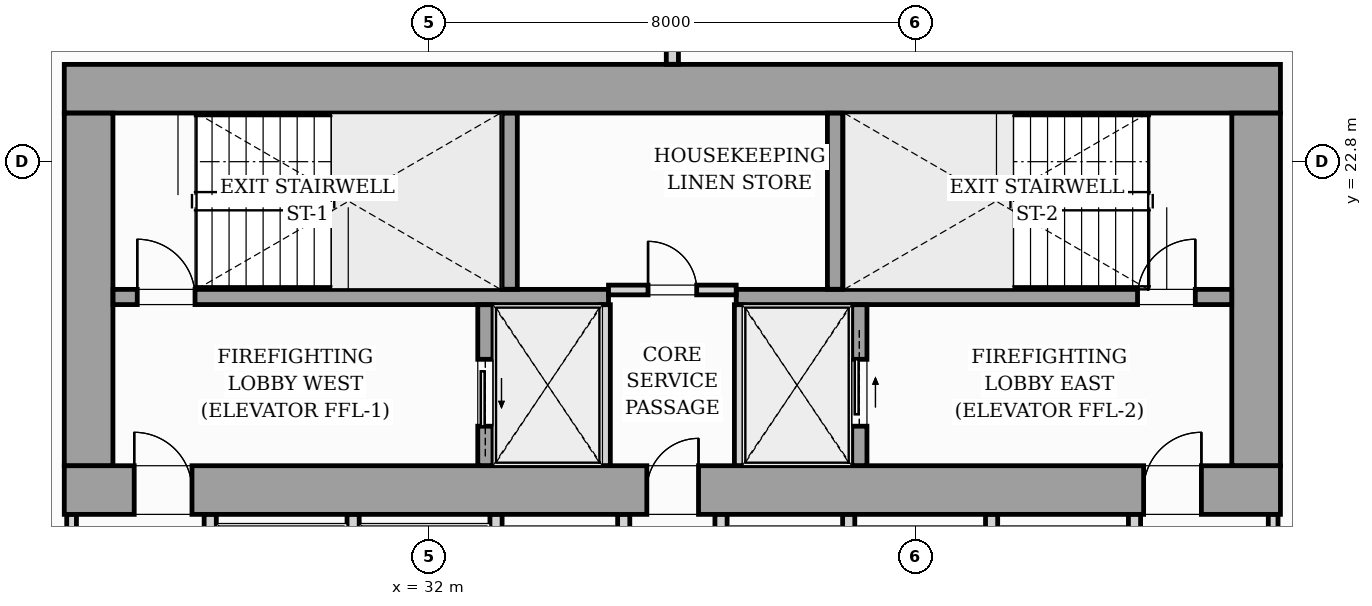
"""IFC4 building model, lengths in metres.
Left out: names, types, materials, properties, quantities, classifications, styles, units other than length and angle.
Written with IfcOpenShell. Run it as: python <this file> out.ifc"""

import sys

from ifc_helpers import new_model, si_unit, direction, frame, frame_2d, origin, origin_2d, place, context, subcontext, project, spatial, rectangle, i_section, extrude, source, transform, mapped, element, fill, save


model = new_model("IFC4")
c1 = context("Model", 3, precision=1e-05, world=origin(), true_north=direction((0.0, 1.0)))
c2 = subcontext(c1, "Body", "Model", "MODEL_VIEW")
j1 = project(units=[si_unit("LENGTHUNIT", "METRE"), si_unit("PLANEANGLEUNIT", "RADIAN")], contexts=[c1])
p1 = place(None, origin())
s1 = spatial("IfcSite", under=j1, at=p1, CompositionType="ELEMENT")
p2 = place(p1, origin())
s2 = spatial("IfcBuilding", under=s1, at=p2, CompositionType="ELEMENT")
p3 = place(p2, frame((0.0, 0.0, 39.0)))
s3 = spatial("IfcBuildingStorey", under=s2, at=p3, CompositionType="ELEMENT", Elevation=39.0)
m1 = source(origin(), c2, "Body", "SweptSolid", [
    extrude(i_section(OverallWidth=0.437, OverallDepth=0.514, WebThickness=0.061, FlangeThickness=0.097, FilletRadius=0.018, at=origin_2d()), origin(), (0.0, 0.0, 1.0), 3.196),
])
for number, where, z_axis, x_axis in (
    (1, (26.4, 17.4, 0.002), (0.0, 0.0, 1.0), (1.0, 0.0, 0.0)),
    (2, (33.12, 17.4, 0.002), (0.0, 0.0, 1.0), (1.0, 0.0, 0.0)),
    (3, (38.88, 17.4, 0.002), (0.0, 0.0, 1.0), (1.0, 0.0, 0.0)),
    (4, (45.6, 17.4, 0.002), (0.0, 0.0, 1.0), (1.0, 0.0, 0.0)),
    (5, (26.4, 24.0, 0.002), (0.0, 0.0, 1.0), (1.0, 0.0, 0.0)),
    (6, (33.12, 24.0, 0.002), (0.0, 0.0, 1.0), (1.0, 0.0, 0.0)),
    (7, (38.88, 24.0, 0.002), (0.0, 0.0, 1.0), (1.0, 0.0, 0.0)),
    (8, (45.6, 24.0, 0.002), (0.0, 0.0, 1.0), (1.0, 0.0, 0.0)),
):
    element("IfcColumn", number, at=place(p3, frame(where, z_axis=z_axis, x_axis=x_axis)), inside=s3, PredefinedType="PILASTER", context=c2, shape_type="MappedRepresentation", body=[
        mapped(m1, transform((0.0, 0.0, 0.0), scale=1.0)),
    ])
p4 = place(p3, frame((26.0, 17.4, 0.0), z_axis=(0.0, 0.0, 1.0), x_axis=(1.0, 0.0, 0.0)))
e9 = element("IfcWall", 9, at=p4, inside=s3, PredefinedType="SHEAR", context=c2, shape_type="SweptSolid", body=[
    extrude(rectangle(XDim=20.0, YDim=0.8, at=frame_2d((10.0, 0.0))), origin(), (0.0, 0.0, 1.0), 3.2),
])
p5 = place(p4, frame((1.15, 0.0, 0.0)))
e10 = element("IfcOpeningElement", 10, at=p5, cuts=e9, PredefinedType="OPENING", context=c2, shape_type="SweptSolid", body=[
    extrude(rectangle(XDim=0.95, YDim=2.06, at=frame_2d((0.475, 1.03))), frame((0.0, 0.41, 0.0), z_axis=(0.0, -1.0, 0.0), x_axis=(1.0, 0.0, 0.0)), (0.0, 0.0, 1.0), 0.82),
])
p6 = place(p4, frame((9.58, 0.0, 0.0)))
e11 = element("IfcOpeningElement", 11, at=p6, cuts=e9, PredefinedType="OPENING", context=c2, shape_type="SweptSolid", body=[
    extrude(rectangle(XDim=0.85, YDim=2.0, at=frame_2d((0.425, 1.0))), frame((0.0, 0.41, 0.0), z_axis=(0.0, -1.0, 0.0), x_axis=(1.0, 0.0, 0.0)), (0.0, 0.0, 1.0), 0.82),
])
p7 = place(p4, frame((17.75, 0.0, 0.0)))
e12 = element("IfcOpeningElement", 12, at=p7, cuts=e9, PredefinedType="OPENING", context=c2, shape_type="SweptSolid", body=[
    extrude(rectangle(XDim=0.95, YDim=2.06, at=frame_2d((0.475, 1.03))), frame((0.0, 0.41, 0.0), z_axis=(0.0, -1.0, 0.0), x_axis=(1.0, 0.0, 0.0)), (0.0, 0.0, 1.0), 0.82),
])
p8 = place(p3, frame((26.0, 24.0, 0.0), z_axis=(0.0, 0.0, 1.0), x_axis=(1.0, 0.0, 0.0)))
e13 = element("IfcWall", 13, at=p8, inside=s3, PredefinedType="SHEAR", context=c2, shape_type="SweptSolid", body=[
    extrude(rectangle(XDim=20.0, YDim=0.8, at=frame_2d((10.0, 0.0))), origin(), (0.0, 0.0, 1.0), 3.2),
])
for number, where, z_axis, x_axis in (
    (14, (26.4, 17.802, 0.0), (0.0, 0.0, 1.0), (0.0, 1.0, 0.0)),
    (15, (45.6, 17.802, 0.0), (0.0, 0.0, 1.0), (0.0, 1.0, 0.0)),
):
    element("IfcWall", number, at=place(p3, frame(where, z_axis=z_axis, x_axis=x_axis)), inside=s3, PredefinedType="SHEAR", context=c2, shape_type="SweptSolid", body=[
        extrude(rectangle(XDim=5.796, YDim=0.8, at=frame_2d((2.898, 0.0))), origin(), (0.0, 0.0, 1.0), 3.2),
    ])
p9 = place(p3, frame((26.802, 20.575, 0.0), z_axis=(0.0, 0.0, 1.0), x_axis=(1.0, 0.0, 0.0)))
e16 = element("IfcWall", 16, at=p9, inside=s3, PredefinedType="SOLIDWALL", context=c2, shape_type="SweptSolid", body=[
    extrude(rectangle(XDim=8.148, YDim=0.25, at=frame_2d((4.074, 0.0))), origin(), (0.0, 0.0, 1.0), 3.2),
])
p10 = place(p9, frame((0.398, 0.0, 0.0)))
e17 = element("IfcOpeningElement", 17, at=p10, cuts=e16, PredefinedType="OPENING", context=c2, shape_type="SweptSolid", body=[
    extrude(rectangle(XDim=0.95, YDim=2.06, at=frame_2d((0.475, 1.03))), frame((0.0, 0.135, 0.0), z_axis=(0.0, -1.0, 0.0), x_axis=(1.0, 0.0, 0.0)), (0.0, 0.0, 1.0), 0.27),
])
p11 = place(p3, frame((37.05, 20.575, 0.0), z_axis=(0.0, 0.0, 1.0), x_axis=(1.0, 0.0, 0.0)))
e18 = element("IfcWall", 18, at=p11, inside=s3, PredefinedType="SOLIDWALL", context=c2, shape_type="SweptSolid", body=[
    extrude(rectangle(XDim=8.148, YDim=0.25, at=frame_2d((4.074, 0.0))), origin(), (0.0, 0.0, 1.0), 3.2),
])
p12 = place(p11, frame((6.6, 0.0, 0.0)))
e19 = element("IfcOpeningElement", 19, at=p12, cuts=e18, PredefinedType="OPENING", context=c2, shape_type="SweptSolid", body=[
    extrude(rectangle(XDim=0.95, YDim=2.06, at=frame_2d((0.475, 1.03))), frame((0.0, 0.135, 0.0), z_axis=(0.0, -1.0, 0.0), x_axis=(1.0, 0.0, 0.0)), (0.0, 0.0, 1.0), 0.27),
])
for number, where, z_axis, x_axis in (
    (20, (33.325, 20.702, 0.0), (0.0, 0.0, 1.0), (0.0, 1.0, 0.0)),
    (21, (38.675, 20.702, 0.0), (0.0, 0.0, 1.0), (0.0, 1.0, 0.0)),
):
    element("IfcWall", number, at=place(p3, frame(where, z_axis=z_axis, x_axis=x_axis)), inside=s3, PredefinedType="SOLIDWALL", context=c2, shape_type="SweptSolid", body=[
        extrude(rectangle(XDim=2.896, YDim=0.25, at=frame_2d((1.448, 0.0))), origin(), (0.0, 0.0, 1.0), 3.2),
    ])
p13 = place(p3, frame((32.925, 17.802, 0.0), z_axis=(0.0, 0.0, 1.0), x_axis=(0.0, 1.0, 0.0)))
e22 = element("IfcWall", 22, at=p13, inside=s3, PredefinedType="SOLIDWALL", context=c2, shape_type="SweptSolid", body=[
    extrude(rectangle(XDim=2.646, YDim=0.25, at=frame_2d((1.323, 0.0))), origin(), (0.0, 0.0, 1.0), 3.2),
])
p14 = place(p13, frame((0.648, 0.0, 0.0)))
e23 = element("IfcOpeningElement", 23, at=p14, cuts=e22, PredefinedType="OPENING", context=c2, shape_type="SweptSolid", body=[
    extrude(rectangle(XDim=1.1, YDim=2.08, at=frame_2d((0.55, 1.04))), frame((0.0, 0.135, 0.0), z_axis=(0.0, -1.0, 0.0), x_axis=(1.0, 0.0, 0.0)), (0.0, 0.0, 1.0), 0.27),
])
for number, where, z_axis, x_axis in (
    (24, (34.9, 17.802, 0.0), (0.0, 0.0, 1.0), (0.0, 1.0, 0.0)),
    (25, (37.1, 17.802, 0.0), (0.0, 0.0, 1.0), (0.0, 1.0, 0.0)),
):
    element("IfcWall", number, at=place(p3, frame(where, z_axis=z_axis, x_axis=x_axis)), inside=s3, PredefinedType="PARTITIONING", context=c2, shape_type="SweptSolid", body=[
        extrude(rectangle(XDim=2.646, YDim=0.16, at=frame_2d((1.323, 0.0))), origin(), (0.0, 0.0, 1.0), 2.94),
    ])
p15 = place(p3, frame((39.075, 17.802, 0.0), z_axis=(0.0, 0.0, 1.0), x_axis=(0.0, 1.0, 0.0)))
e26 = element("IfcWall", 26, at=p15, inside=s3, PredefinedType="SOLIDWALL", context=c2, shape_type="SweptSolid", body=[
    extrude(rectangle(XDim=2.646, YDim=0.25, at=frame_2d((1.323, 0.0))), origin(), (0.0, 0.0, 1.0), 3.2),
])
p16 = place(p15, frame((0.648, 0.0, 0.0)))
e27 = element("IfcOpeningElement", 27, at=p16, cuts=e26, PredefinedType="OPENING", context=c2, shape_type="SweptSolid", body=[
    extrude(rectangle(XDim=1.1, YDim=2.08, at=frame_2d((0.55, 1.04))), frame((0.0, 0.135, 0.0), z_axis=(0.0, -1.0, 0.0), x_axis=(1.0, 0.0, 0.0)), (0.0, 0.0, 1.0), 0.27),
])
p17 = place(p3, frame((34.95, 20.69, 0.0), z_axis=(0.0, 0.0, 1.0), x_axis=(1.0, 0.0, 0.0)))
e28 = element("IfcWall", 28, at=p17, inside=s3, PredefinedType="PARTITIONING", context=c2, shape_type="SweptSolid", body=[
    extrude(rectangle(XDim=2.1, YDim=0.16, at=frame_2d((1.05, 0.0))), origin(), (0.0, 0.0, 1.0), 2.94),
])
p18 = place(p17, frame((0.65, 0.0, 0.0)))
e29 = element("IfcOpeningElement", 29, at=p18, cuts=e28, PredefinedType="OPENING", context=c2, shape_type="SweptSolid", body=[
    extrude(rectangle(XDim=0.8, YDim=2.05, at=frame_2d((0.4, 1.025))), frame((0.0, 0.09, 0.0), z_axis=(0.0, -1.0, 0.0), x_axis=(1.0, 0.0, 0.0)), (0.0, 0.0, 1.0), 0.18),
])
for number, where, z_axis, x_axis in (
    (30, (28.4, 14.75, 0.0), (0.0, 0.0, 1.0), (0.0, 1.0, 0.0)),
    (31, (30.75, 14.75, 0.0), (0.0, 0.0, 1.0), (0.0, 1.0, 0.0)),
    (32, (33.1, 14.75, 0.0), (0.0, 0.0, 1.0), (0.0, 1.0, 0.0)),
    (33, (35.2, 14.75, 0.0), (0.0, 0.0, 1.0), (0.0, 1.0, 0.0)),
    (34, (36.8, 14.75, 0.0), (0.0, 0.0, 1.0), (0.0, 1.0, 0.0)),
    (35, (38.9, 14.75, 0.0), (0.0, 0.0, 1.0), (0.0, 1.0, 0.0)),
    (36, (41.25, 14.75, 0.0), (0.0, 0.0, 1.0), (0.0, 1.0, 0.0)),
    (37, (43.6, 14.75, 0.0), (0.0, 0.0, 1.0), (0.0, 1.0, 0.0)),
):
    element("IfcWall", number, at=place(p3, frame(where, z_axis=z_axis, x_axis=x_axis)), inside=s3, PredefinedType="PARTITIONING", context=c2, shape_type="SweptSolid", body=[
        extrude(rectangle(XDim=2.248, YDim=0.2, at=frame_2d((1.124, 0.0))), origin(), (0.0, 0.0, 1.0), 2.94),
    ])
p19 = place(p3, frame((36.0, 24.402, 0.0), z_axis=(0.0, 0.0, 1.0), x_axis=(0.0, 1.0, 0.0)))
e38 = element("IfcWall", 38, at=p19, inside=s3, PredefinedType="PARTITIONING", context=c2, shape_type="SweptSolid", body=[
    extrude(rectangle(XDim=3.218, YDim=0.2, at=frame_2d((1.609, 0.0))), origin(), (0.0, 0.0, 1.0), 2.94),
])
for number, where, z_axis, x_axis in (
    (39, (26.12, 14.762, 0.0), (0.0, 0.0, 1.0), (0.0, 1.0, 0.0)),
    (40, (45.88, 14.762, 0.0), (0.0, 0.0, 1.0), (0.0, 1.0, 0.0)),
):
    element("IfcWall", number, at=place(p3, frame(where, z_axis=z_axis, x_axis=x_axis)), inside=s3, PredefinedType="PARTITIONING", context=c2, shape_type="SweptSolid", body=[
        extrude(rectangle(XDim=2.236, YDim=0.16, at=frame_2d((1.118, 0.0))), origin(), (0.0, 0.0, 1.0), 2.94),
    ])
m2 = source(origin(), c2, "Body", "SweptSolid", [
    extrude(rectangle(XDim=0.95, YDim=2.06, at=frame_2d((0.475, 1.03))), frame((0.0, 0.025, 0.0), z_axis=(0.0, -1.0, 0.0), x_axis=(1.0, 0.0, 0.0)), (0.0, 0.0, 1.0), 0.05),
])
p20 = place(p5, origin())
e41 = element("IfcDoor", 41, at=p20, inside=s3, OperationType="SINGLE_SWING_LEFT", PredefinedType="DOOR", context=c2, shape_type="MappedRepresentation", body=[
    mapped(m2, transform((0.0, 0.0, 0.0), scale=1.0)),
])
fill(e10, e41)
m3 = source(origin(), c2, "Body", "SweptSolid", [
    extrude(rectangle(XDim=0.85, YDim=2.0, at=frame_2d((0.425, 1.0))), frame((0.0, 0.025, 0.0), z_axis=(0.0, -1.0, 0.0), x_axis=(1.0, 0.0, 0.0)), (0.0, 0.0, 1.0), 0.05),
])
p21 = place(p6, origin())
e42 = element("IfcDoor", 42, at=p21, inside=s3, OperationType="SINGLE_SWING_RIGHT", PredefinedType="DOOR", context=c2, shape_type="MappedRepresentation", body=[
    mapped(m3, transform((0.0, 0.0, 0.0), scale=1.0)),
])
fill(e11, e42)
p22 = place(p7, origin())
e43 = element("IfcDoor", 43, at=p22, inside=s3, OperationType="SINGLE_SWING_RIGHT", PredefinedType="DOOR", context=c2, shape_type="MappedRepresentation", body=[
    mapped(m2, transform((0.0, 0.0, 0.0), scale=1.0)),
])
fill(e12, e43)
p23 = place(p10, origin())
e44 = element("IfcDoor", 44, at=p23, inside=s3, OperationType="SINGLE_SWING_LEFT", PredefinedType="DOOR", context=c2, shape_type="MappedRepresentation", body=[
    mapped(m2, transform((0.0, 0.0, 0.0), scale=1.0)),
])
fill(e17, e44)
p24 = place(p12, origin())
e45 = element("IfcDoor", 45, at=p24, inside=s3, OperationType="SINGLE_SWING_RIGHT", PredefinedType="DOOR", context=c2, shape_type="MappedRepresentation", body=[
    mapped(m2, transform((0.0, 0.0, 0.0), scale=1.0)),
])
fill(e19, e45)
m4 = source(origin(), c2, "Body", "SweptSolid", [
    extrude(rectangle(XDim=1.1, YDim=2.08, at=frame_2d((0.55, 1.04))), frame((0.0, 0.025, 0.0), z_axis=(0.0, -1.0, 0.0), x_axis=(1.0, 0.0, 0.0)), (0.0, 0.0, 1.0), 0.05),
])
p25 = place(p14, origin())
e46 = element("IfcDoor", 46, at=p25, inside=s3, OperationType="SLIDING_TO_LEFT", PredefinedType="DOOR", context=c2, shape_type="MappedRepresentation", body=[
    mapped(m4, transform((0.0, 0.0, 0.0), scale=1.0)),
])
fill(e23, e46)
p26 = place(p16, origin())
e47 = element("IfcDoor", 47, at=p26, inside=s3, OperationType="SLIDING_TO_RIGHT", PredefinedType="DOOR", context=c2, shape_type="MappedRepresentation", body=[
    mapped(m4, transform((0.0, 0.0, 0.0), scale=1.0)),
])
fill(e27, e47)
m5 = source(origin(), c2, "Body", "SweptSolid", [
    extrude(rectangle(XDim=0.8, YDim=2.05, at=frame_2d((0.4, 1.025))), frame((0.0, 0.025, 0.0), z_axis=(0.0, -1.0, 0.0), x_axis=(1.0, 0.0, 0.0)), (0.0, 0.0, 1.0), 0.05),
])
p27 = place(p18, origin())
e48 = element("IfcDoor", 48, at=p27, inside=s3, OperationType="SINGLE_SWING_LEFT", PredefinedType="DOOR", context=c2, shape_type="MappedRepresentation", body=[
    mapped(m5, transform((0.0, 0.0, 0.0), scale=1.0)),
])
fill(e29, e48)
save(model, sys.argv[1])
